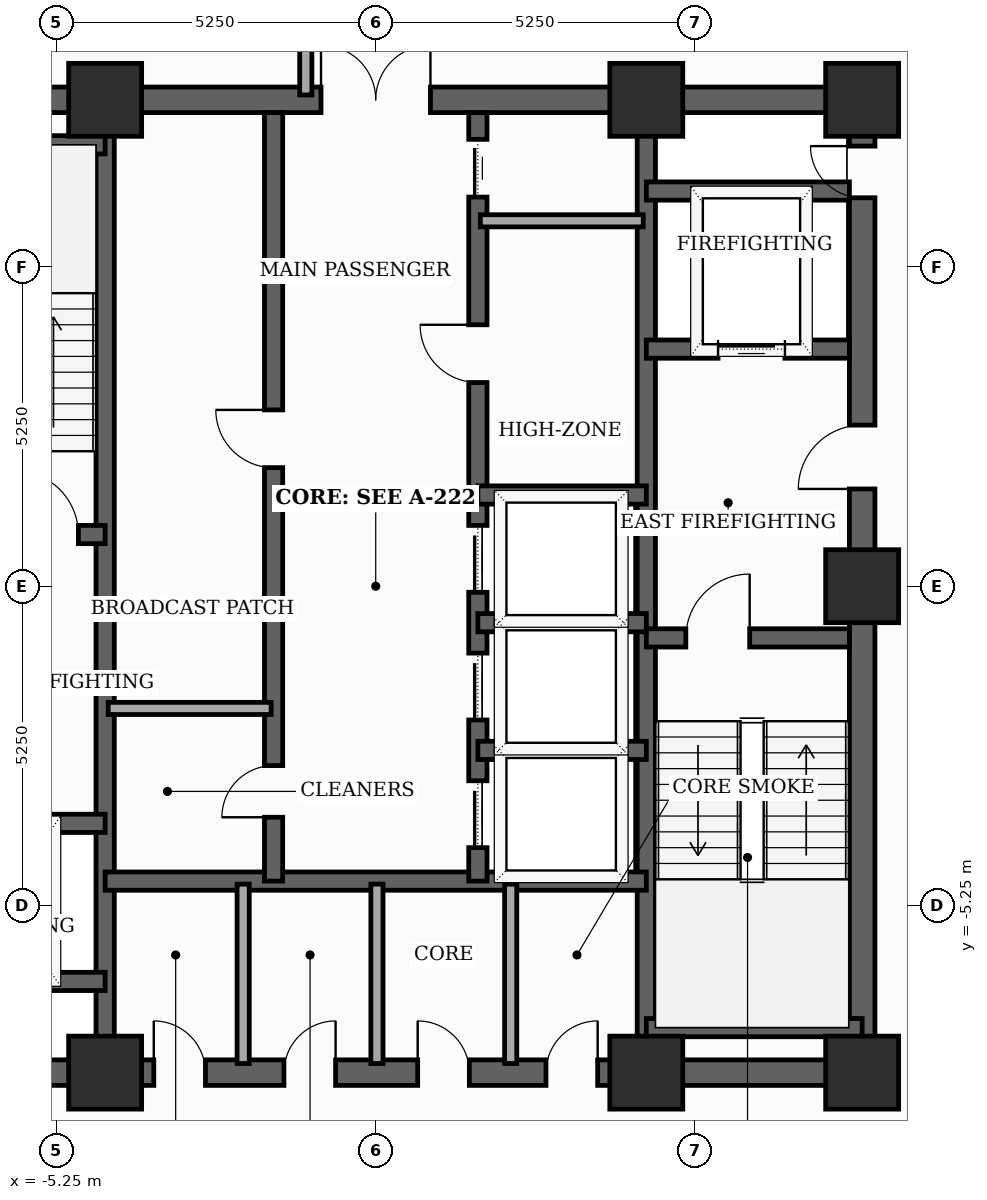
"""IFC4 building model, lengths in metres.
Left out: names, types, materials, properties, quantities, classifications, styles, units other than length and angle.
Written with IfcOpenShell. Run it as: python <this file> out.ifc"""

import sys

from ifc_helpers import new_model, si_unit, direction, frame, frame_2d, origin, origin_2d, place, context, subcontext, project, spatial, rectangle, extrude, element, fill, save


model = new_model("IFC4")
c1 = context("Model", 3, precision=1e-05, world=origin(), true_north=direction((0.0, 1.0)))
c2 = subcontext(c1, "Body", "Model", "MODEL_VIEW")
j1 = project(units=[si_unit("LENGTHUNIT", "METRE"), si_unit("PLANEANGLEUNIT", "RADIAN")], contexts=[c1])
p1 = place(None, origin())
s1 = spatial("IfcSite", under=j1, at=p1, CompositionType="ELEMENT")
p2 = place(p1, origin())
s2 = spatial("IfcBuilding", under=s1, at=p2, CompositionType="ELEMENT")
p3 = place(p2, frame((0.0, 0.0, 241.1)))
s3 = spatial("IfcBuildingStorey", under=s2, at=p3, CompositionType="ELEMENT", Elevation=241.1)
for number, where, z_axis, x_axis in (
    (1, (-4.45, -8.0, 0.0), (0.0, 0.0, 1.0), (1.0, 0.0, 0.0)),
    (2, (4.45, -8.0, 0.0), (0.0, 0.0, 1.0), (1.0, 0.0, 0.0)),
    (3, (8.0, -8.0, 0.0), (0.0, 0.0, 1.0), (1.0, 0.0, 0.0)),
    (4, (8.0, 0.0, 0.0), (0.0, 0.0, 1.0), (1.0, 0.0, 0.0)),
    (5, (8.0, 8.0, 0.0), (0.0, 0.0, 1.0), (1.0, 0.0, 0.0)),
    (6, (4.45, 8.0, 0.0), (0.0, 0.0, 1.0), (1.0, 0.0, 0.0)),
    (7, (-4.45, 8.0, 0.0), (0.0, 0.0, 1.0), (1.0, 0.0, 0.0)),
):
    element("IfcColumn", number, at=place(p3, frame(where, z_axis=z_axis, x_axis=x_axis)), inside=s3, PredefinedType="COLUMN", context=c2, shape_type="SweptSolid", body=[
        extrude(rectangle(XDim=1.2, YDim=1.2, at=origin_2d()), origin(), (0.0, 0.0, 1.0), 3.7),
    ])
p4 = place(p3, frame((8.0, -8.0, 0.0), z_axis=(0.0, 0.0, 1.0), x_axis=(0.0, 1.0, 0.0)))
e8 = element("IfcWall", 8, at=p4, inside=s3, PredefinedType="SHEAR", context=c2, shape_type="SweptSolid", body=[
    extrude(rectangle(XDim=16.0, YDim=0.42, at=frame_2d((8.0, 0.0))), origin(), (0.0, 0.0, 1.0), 3.5),
])
p5 = place(p4, frame((9.6, 0.0, 0.0)))
e9 = element("IfcOpeningElement", 9, at=p5, cuts=e8, PredefinedType="OPENING", context=c2, shape_type="SweptSolid", body=[
    extrude(rectangle(XDim=1.05, YDim=2.15, at=frame_2d((0.525, 1.075))), frame((0.0, 0.22, 0.0), z_axis=(0.0, -1.0, 0.0), x_axis=(1.0, 0.0, 0.0)), (0.0, 0.0, 1.0), 0.44),
])
p6 = place(p4, frame((14.389, 0.0, 0.0)))
e10 = element("IfcOpeningElement", 10, at=p6, cuts=e8, PredefinedType="OPENING", context=c2, shape_type="SweptSolid", body=[
    extrude(rectangle(XDim=0.85, YDim=2.02, at=frame_2d((0.425, 1.01))), frame((0.0, 0.22, 0.0), z_axis=(0.0, -1.0, 0.0), x_axis=(1.0, 0.0, 0.0)), (0.0, 0.0, 1.0), 0.44),
])
p7 = place(p3, frame((-8.0, -8.0, 0.0), z_axis=(0.0, 0.0, 1.0), x_axis=(1.0, 0.0, 0.0)))
e11 = element("IfcWall", 11, at=p7, inside=s3, PredefinedType="SHEAR", context=c2, shape_type="SweptSolid", body=[
    extrude(rectangle(XDim=16.0, YDim=0.42, at=frame_2d((8.0, 0.0))), origin(), (0.0, 0.0, 1.0), 3.5),
])
p8 = place(p7, frame((4.35, 0.0, 0.0)))
e12 = element("IfcOpeningElement", 12, at=p8, cuts=e11, PredefinedType="OPENING", context=c2, shape_type="SweptSolid", body=[
    extrude(rectangle(XDim=0.85, YDim=2.02, at=frame_2d((0.425, 1.01))), frame((0.0, 0.22, 0.0), z_axis=(0.0, -1.0, 0.0), x_axis=(1.0, 0.0, 0.0)), (0.0, 0.0, 1.0), 0.44),
])
p9 = place(p7, frame((6.49, 0.0, 0.0)))
e13 = element("IfcOpeningElement", 13, at=p9, cuts=e11, PredefinedType="OPENING", context=c2, shape_type="SweptSolid", body=[
    extrude(rectangle(XDim=0.85, YDim=2.02, at=frame_2d((0.425, 1.01))), frame((0.0, 0.22, 0.0), z_axis=(0.0, -1.0, 0.0), x_axis=(1.0, 0.0, 0.0)), (0.0, 0.0, 1.0), 0.44),
])
p10 = place(p7, frame((8.69, 0.0, 0.0)))
e14 = element("IfcOpeningElement", 14, at=p10, cuts=e11, PredefinedType="OPENING", context=c2, shape_type="SweptSolid", body=[
    extrude(rectangle(XDim=0.85, YDim=2.02, at=frame_2d((0.425, 1.01))), frame((0.0, 0.22, 0.0), z_axis=(0.0, -1.0, 0.0), x_axis=(1.0, 0.0, 0.0)), (0.0, 0.0, 1.0), 0.44),
])
p11 = place(p7, frame((10.8, 0.0, 0.0)))
e15 = element("IfcOpeningElement", 15, at=p11, cuts=e11, PredefinedType="OPENING", context=c2, shape_type="SweptSolid", body=[
    extrude(rectangle(XDim=0.85, YDim=2.02, at=frame_2d((0.425, 1.01))), frame((0.0, 0.22, 0.0), z_axis=(0.0, -1.0, 0.0), x_axis=(1.0, 0.0, 0.0)), (0.0, 0.0, 1.0), 0.44),
])
p12 = place(p3, frame((-8.0, 8.0, 0.0), z_axis=(0.0, 0.0, 1.0), x_axis=(1.0, 0.0, 0.0)))
e16 = element("IfcWall", 16, at=p12, inside=s3, PredefinedType="SHEAR", context=c2, shape_type="SweptSolid", body=[
    extrude(rectangle(XDim=16.0, YDim=0.42, at=frame_2d((8.0, 0.0))), origin(), (0.0, 0.0, 1.0), 3.5),
])
p13 = place(p12, frame((7.1, 0.0, 0.0)))
e17 = element("IfcOpeningElement", 17, at=p13, cuts=e16, PredefinedType="OPENING", context=c2, shape_type="SweptSolid", body=[
    extrude(rectangle(XDim=1.8, YDim=2.15, at=frame_2d((0.9, 1.075))), frame((0.0, 0.22, 0.0), z_axis=(0.0, -1.0, 0.0), x_axis=(1.0, 0.0, 0.0)), (0.0, 0.0, 1.0), 0.44),
])
for number, where, z_axis, x_axis in (
    (18, (-4.45, -7.79, 0.0), (0.0, 0.0, 1.0), (0.0, 1.0, 0.0)),
    (19, (4.45, -7.79, 0.0), (0.0, 0.0, 1.0), (0.0, 1.0, 0.0)),
):
    element("IfcWall", number, at=place(p3, frame(where, z_axis=z_axis, x_axis=x_axis)), inside=s3, PredefinedType="SHEAR", context=c2, shape_type="SweptSolid", body=[
        extrude(rectangle(XDim=15.58, YDim=0.3, at=frame_2d((7.79, 0.0))), origin(), (0.0, 0.0, 1.0), 3.5),
    ])
p14 = place(p3, frame((-7.79, 0.85, 0.0), z_axis=(0.0, 0.0, 1.0), x_axis=(1.0, 0.0, 0.0)))
e20 = element("IfcWall", 20, at=p14, inside=s3, PredefinedType="SHEAR", context=c2, shape_type="SweptSolid", body=[
    extrude(rectangle(XDim=3.34, YDim=0.3, at=frame_2d((1.67, 0.0))), origin(), (0.0, 0.0, 1.0), 3.5),
])
p15 = place(p14, frame((1.85, 0.0, 0.0)))
e21 = element("IfcOpeningElement", 21, at=p15, cuts=e20, PredefinedType="OPENING", context=c2, shape_type="SweptSolid", body=[
    extrude(rectangle(XDim=1.05, YDim=2.15, at=frame_2d((0.525, 1.075))), frame((0.0, 0.16, 0.0), z_axis=(0.0, -1.0, 0.0), x_axis=(1.0, 0.0, 0.0)), (0.0, 0.0, 1.0), 0.32),
])
p16 = place(p3, frame((-7.79, 7.26, 0.0), z_axis=(0.0, 0.0, 1.0), x_axis=(1.0, 0.0, 0.0)))
e22 = element("IfcWall", 22, at=p16, inside=s3, PredefinedType="SHEAR", context=c2, shape_type="SweptSolid", body=[
    extrude(rectangle(XDim=3.34, YDim=0.3, at=frame_2d((1.67, 0.0))), origin(), (0.0, 0.0, 1.0), 3.5),
])
p17 = place(p3, frame((4.45, -0.85, 0.0), z_axis=(0.0, 0.0, 1.0), x_axis=(1.0, 0.0, 0.0)))
e23 = element("IfcWall", 23, at=p17, inside=s3, PredefinedType="SHEAR", context=c2, shape_type="SweptSolid", body=[
    extrude(rectangle(XDim=3.34, YDim=0.3, at=frame_2d((1.67, 0.0))), origin(), (0.0, 0.0, 1.0), 3.5),
])
p18 = place(p17, frame((0.65, 0.0, 0.0)))
e24 = element("IfcOpeningElement", 24, at=p18, cuts=e23, PredefinedType="OPENING", context=c2, shape_type="SweptSolid", body=[
    extrude(rectangle(XDim=1.05, YDim=2.15, at=frame_2d((0.525, 1.075))), frame((0.0, 0.16, 0.0), z_axis=(0.0, -1.0, 0.0), x_axis=(1.0, 0.0, 0.0)), (0.0, 0.0, 1.0), 0.32),
])
p19 = place(p3, frame((4.45, -7.26, 0.0), z_axis=(0.0, 0.0, 1.0), x_axis=(1.0, 0.0, 0.0)))
e25 = element("IfcWall", 25, at=p19, inside=s3, PredefinedType="SHEAR", context=c2, shape_type="SweptSolid", body=[
    extrude(rectangle(XDim=3.55, YDim=0.3, at=frame_2d((1.775, 0.0))), origin(), (0.0, 0.0, 1.0), 3.5),
])
p20 = place(p3, frame((-7.79, -3.9, 0.0), z_axis=(0.0, 0.0, 1.0), x_axis=(1.0, 0.0, 0.0)))
e26 = element("IfcWall", 26, at=p20, inside=s3, PredefinedType="SHEAR", context=c2, shape_type="SweptSolid", body=[
    extrude(rectangle(XDim=3.34, YDim=0.3, at=frame_2d((1.67, 0.0))), origin(), (0.0, 0.0, 1.0), 3.5),
])
p21 = place(p20, frame((1.27, 0.0, 0.0)))
e27 = element("IfcOpeningElement", 27, at=p21, cuts=e26, PredefinedType="OPENING", context=c2, shape_type="SweptSolid", body=[
    extrude(rectangle(XDim=1.1, YDim=2.1, at=frame_2d((0.55, 1.05))), frame((0.0, 0.16, 0.0), z_axis=(0.0, -1.0, 0.0), x_axis=(1.0, 0.0, 0.0)), (0.0, 0.0, 1.0), 0.32),
])
p22 = place(p3, frame((-7.79, -6.5, 0.0), z_axis=(0.0, 0.0, 1.0), x_axis=(1.0, 0.0, 0.0)))
e28 = element("IfcWall", 28, at=p22, inside=s3, PredefinedType="SHEAR", context=c2, shape_type="SweptSolid", body=[
    extrude(rectangle(XDim=3.34, YDim=0.3, at=frame_2d((1.67, 0.0))), origin(), (0.0, 0.0, 1.0), 3.5),
])
p23 = place(p3, frame((4.45, 3.9, 0.0), z_axis=(0.0, 0.0, 1.0), x_axis=(1.0, 0.0, 0.0)))
e29 = element("IfcWall", 29, at=p23, inside=s3, PredefinedType="SHEAR", context=c2, shape_type="SweptSolid", body=[
    extrude(rectangle(XDim=3.34, YDim=0.3, at=frame_2d((1.67, 0.0))), origin(), (0.0, 0.0, 1.0), 3.5),
])
p24 = place(p23, frame((1.18, 0.0, 0.0)))
e30 = element("IfcOpeningElement", 30, at=p24, cuts=e29, PredefinedType="OPENING", context=c2, shape_type="SweptSolid", body=[
    extrude(rectangle(XDim=1.1, YDim=2.1, at=frame_2d((0.55, 1.05))), frame((0.0, 0.16, 0.0), z_axis=(0.0, -1.0, 0.0), x_axis=(1.0, 0.0, 0.0)), (0.0, 0.0, 1.0), 0.32),
])
p25 = place(p3, frame((4.45, 6.5, 0.0), z_axis=(0.0, 0.0, 1.0), x_axis=(1.0, 0.0, 0.0)))
e31 = element("IfcWall", 31, at=p25, inside=s3, PredefinedType="SHEAR", context=c2, shape_type="SweptSolid", body=[
    extrude(rectangle(XDim=3.34, YDim=0.3, at=frame_2d((1.67, 0.0))), origin(), (0.0, 0.0, 1.0), 3.5),
])
p26 = place(p3, frame((-4.45, -4.85, 0.0), z_axis=(0.0, 0.0, 1.0), x_axis=(1.0, 0.0, 0.0)))
e32 = element("IfcWall", 32, at=p26, inside=s3, PredefinedType="SHEAR", context=c2, shape_type="SweptSolid", body=[
    extrude(rectangle(XDim=8.9, YDim=0.3, at=frame_2d((4.45, 0.0))), origin(), (0.0, 0.0, 1.0), 3.5),
])
p27 = place(p3, frame((-1.68, -4.85, 0.0), z_axis=(0.0, 0.0, 1.0), x_axis=(0.0, 1.0, 0.0)))
e33 = element("IfcWall", 33, at=p27, inside=s3, PredefinedType="SHEAR", context=c2, shape_type="SweptSolid", body=[
    extrude(rectangle(XDim=12.64, YDim=0.3, at=frame_2d((6.32, 0.0))), origin(), (0.0, 0.0, 1.0), 3.5),
])
p28 = place(p27, frame((1.05, 0.0, 0.0)))
e34 = element("IfcOpeningElement", 34, at=p28, cuts=e33, PredefinedType="OPENING", context=c2, shape_type="SweptSolid", body=[
    extrude(rectangle(XDim=0.85, YDim=2.02, at=frame_2d((0.425, 1.01))), frame((0.0, 0.16, 0.0), z_axis=(0.0, -1.0, 0.0), x_axis=(1.0, 0.0, 0.0)), (0.0, 0.0, 1.0), 0.32),
])
p29 = place(p27, frame((6.8, 0.0, 0.0)))
e35 = element("IfcOpeningElement", 35, at=p29, cuts=e33, PredefinedType="OPENING", context=c2, shape_type="SweptSolid", body=[
    extrude(rectangle(XDim=0.95, YDim=2.1, at=frame_2d((0.475, 1.05))), frame((0.0, 0.16, 0.0), z_axis=(0.0, -1.0, 0.0), x_axis=(1.0, 0.0, 0.0)), (0.0, 0.0, 1.0), 0.32),
])
p30 = place(p3, frame((1.68, -4.85, 0.0), z_axis=(0.0, 0.0, 1.0), x_axis=(0.0, 1.0, 0.0)))
e36 = element("IfcWall", 36, at=p30, inside=s3, PredefinedType="SHEAR", context=c2, shape_type="SweptSolid", body=[
    extrude(rectangle(XDim=12.64, YDim=0.3, at=frame_2d((6.32, 0.0))), origin(), (0.0, 0.0, 1.0), 3.5),
])
p31 = place(p30, frame((0.55, 0.0, 0.0)))
e37 = element("IfcOpeningElement", 37, at=p31, cuts=e36, PredefinedType="OPENING", context=c2, shape_type="SweptSolid", body=[
    extrude(rectangle(XDim=1.1, YDim=2.1, at=frame_2d((0.55, 1.05))), frame((0.0, 0.16, 0.0), z_axis=(0.0, -1.0, 0.0), x_axis=(1.0, 0.0, 0.0)), (0.0, 0.0, 1.0), 0.32),
])
p32 = place(p30, frame((2.65, 0.0, 0.0)))
e38 = element("IfcOpeningElement", 38, at=p32, cuts=e36, PredefinedType="OPENING", context=c2, shape_type="SweptSolid", body=[
    extrude(rectangle(XDim=1.1, YDim=2.1, at=frame_2d((0.55, 1.05))), frame((0.0, 0.16, 0.0), z_axis=(0.0, -1.0, 0.0), x_axis=(1.0, 0.0, 0.0)), (0.0, 0.0, 1.0), 0.32),
])
p33 = place(p30, frame((4.75, 0.0, 0.0)))
e39 = element("IfcOpeningElement", 39, at=p33, cuts=e36, PredefinedType="OPENING", context=c2, shape_type="SweptSolid", body=[
    extrude(rectangle(XDim=1.1, YDim=2.1, at=frame_2d((0.55, 1.05))), frame((0.0, 0.16, 0.0), z_axis=(0.0, -1.0, 0.0), x_axis=(1.0, 0.0, 0.0)), (0.0, 0.0, 1.0), 0.32),
])
p34 = place(p30, frame((8.2, 0.0, 0.0)))
e40 = element("IfcOpeningElement", 40, at=p34, cuts=e36, PredefinedType="OPENING", context=c2, shape_type="SweptSolid", body=[
    extrude(rectangle(XDim=0.95, YDim=2.1, at=frame_2d((0.475, 1.05))), frame((0.0, 0.16, 0.0), z_axis=(0.0, -1.0, 0.0), x_axis=(1.0, 0.0, 0.0)), (0.0, 0.0, 1.0), 0.32),
])
p35 = place(p30, frame((11.25, 0.0, 0.0)))
e41 = element("IfcOpeningElement", 41, at=p35, cuts=e36, PredefinedType="OPENING", context=c2, shape_type="SweptSolid", body=[
    extrude(rectangle(XDim=0.95, YDim=2.1, at=frame_2d((0.475, 1.05))), frame((0.0, 0.16, 0.0), z_axis=(0.0, -1.0, 0.0), x_axis=(1.0, 0.0, 0.0)), (0.0, 0.0, 1.0), 0.32),
])
for number, where, z_axis, x_axis in (
    (42, (1.68, 1.5, 0.0), (0.0, 0.0, 1.0), (1.0, 0.0, 0.0)),
    (43, (1.68, -2.7, 0.0), (0.0, 0.0, 1.0), (1.0, 0.0, 0.0)),
    (44, (1.68, -0.6, 0.0), (0.0, 0.0, 1.0), (1.0, 0.0, 0.0)),
):
    element("IfcWall", number, at=place(p3, frame(where, z_axis=z_axis, x_axis=x_axis)), inside=s3, PredefinedType="SHEAR", context=c2, shape_type="SweptSolid", body=[
        extrude(rectangle(XDim=2.77, YDim=0.3, at=frame_2d((1.385, 0.0))), origin(), (0.0, 0.0, 1.0), 3.5),
    ])
for number, where, z_axis, x_axis in (
    (45, (-2.18, -7.85, 0.0), (0.0, 0.0, 1.0), (0.0, 1.0, 0.0)),
    (46, (0.02, -7.85, 0.0), (0.0, 0.0, 1.0), (0.0, 1.0, 0.0)),
    (47, (2.22, -7.85, 0.0), (0.0, 0.0, 1.0), (0.0, 1.0, 0.0)),
):
    element("IfcWall", number, at=place(p3, frame(where, z_axis=z_axis, x_axis=x_axis)), inside=s3, PredefinedType="SOLIDWALL", context=c2, shape_type="SweptSolid", body=[
        extrude(rectangle(XDim=2.95, YDim=0.2, at=frame_2d((1.475, 0.0))), origin(), (0.0, 0.0, 1.0), 2.885),
    ])
for number, where, z_axis, x_axis in (
    (48, (-4.4, -2.01, 0.0), (0.0, 0.0, 1.0), (1.0, 0.0, 0.0)),
    (49, (1.72, 6.01, 0.0), (0.0, 0.0, 1.0), (1.0, 0.0, 0.0)),
):
    element("IfcWall", number, at=place(p3, frame(where, z_axis=z_axis, x_axis=x_axis)), inside=s3, PredefinedType="SOLIDWALL", context=c2, shape_type="SweptSolid", body=[
        extrude(rectangle(XDim=2.68, YDim=0.2, at=frame_2d((1.34, 0.0))), origin(), (0.0, 0.0, 1.0), 3.5),
    ])
p36 = place(p3, frame((-1.15, 10.65, 0.0), z_axis=(0.0, 0.0, 1.0), x_axis=(0.0, -1.0, 0.0)))
e50 = element("IfcWall", 50, at=p36, inside=s3, PredefinedType="SOLIDWALL", context=c2, shape_type="SweptSolid", body=[
    extrude(rectangle(XDim=2.57, YDim=0.2, at=frame_2d((1.285, 0.0))), origin(), (0.0, 0.0, 1.0), 2.885),
])
p37 = place(p5, origin())
e51 = element("IfcDoor", 51, at=p37, inside=s3, OperationType="SINGLE_SWING_LEFT", PredefinedType="DOOR", context=c2, shape_type="SweptSolid", body=[
    extrude(rectangle(XDim=1.05, YDim=2.15, at=frame_2d((0.525, 1.075))), frame((0.0, 0.025, 0.0), z_axis=(0.0, -1.0, 0.0), x_axis=(1.0, 0.0, 0.0)), (0.0, 0.0, 1.0), 0.05),
])
fill(e9, e51)
p38 = place(p6, origin())
e52 = element("IfcDoor", 52, at=p38, inside=s3, OperationType="SINGLE_SWING_RIGHT", PredefinedType="TRAPDOOR", context=c2, shape_type="SweptSolid", body=[
    extrude(rectangle(XDim=0.85, YDim=2.02, at=frame_2d((0.425, 1.01))), frame((0.0, 0.025, 0.0), z_axis=(0.0, -1.0, 0.0), x_axis=(1.0, 0.0, 0.0)), (0.0, 0.0, 1.0), 0.05),
])
fill(e10, e52)
p39 = place(p8, origin())
e53 = element("IfcDoor", 53, at=p39, inside=s3, OperationType="SINGLE_SWING_LEFT", PredefinedType="TRAPDOOR", context=c2, shape_type="SweptSolid", body=[
    extrude(rectangle(XDim=0.85, YDim=2.02, at=frame_2d((0.425, 1.01))), frame((0.0, 0.025, 0.0), z_axis=(0.0, -1.0, 0.0), x_axis=(1.0, 0.0, 0.0)), (0.0, 0.0, 1.0), 0.05),
])
fill(e12, e53)
p40 = place(p9, origin())
e54 = element("IfcDoor", 54, at=p40, inside=s3, OperationType="SINGLE_SWING_RIGHT", PredefinedType="TRAPDOOR", context=c2, shape_type="SweptSolid", body=[
    extrude(rectangle(XDim=0.85, YDim=2.02, at=frame_2d((0.425, 1.01))), frame((0.0, 0.025, 0.0), z_axis=(0.0, -1.0, 0.0), x_axis=(1.0, 0.0, 0.0)), (0.0, 0.0, 1.0), 0.05),
])
fill(e13, e54)
p41 = place(p10, origin())
e55 = element("IfcDoor", 55, at=p41, inside=s3, OperationType="SINGLE_SWING_LEFT", PredefinedType="TRAPDOOR", context=c2, shape_type="SweptSolid", body=[
    extrude(rectangle(XDim=0.85, YDim=2.02, at=frame_2d((0.425, 1.01))), frame((0.0, 0.025, 0.0), z_axis=(0.0, -1.0, 0.0), x_axis=(1.0, 0.0, 0.0)), (0.0, 0.0, 1.0), 0.05),
])
fill(e14, e55)
p42 = place(p11, origin())
e56 = element("IfcDoor", 56, at=p42, inside=s3, OperationType="SINGLE_SWING_RIGHT", PredefinedType="TRAPDOOR", context=c2, shape_type="SweptSolid", body=[
    extrude(rectangle(XDim=0.85, YDim=2.02, at=frame_2d((0.425, 1.01))), frame((0.0, 0.025, 0.0), z_axis=(0.0, -1.0, 0.0), x_axis=(1.0, 0.0, 0.0)), (0.0, 0.0, 1.0), 0.05),
])
fill(e15, e56)
p43 = place(p13, origin())
e57 = element("IfcDoor", 57, at=p43, inside=s3, OperationType="DOUBLE_DOOR_SINGLE_SWING", PredefinedType="DOOR", context=c2, shape_type="SweptSolid", body=[
    extrude(rectangle(XDim=1.8, YDim=2.15, at=frame_2d((0.9, 1.075))), frame((0.0, 0.025, 0.0), z_axis=(0.0, -1.0, 0.0), x_axis=(1.0, 0.0, 0.0)), (0.0, 0.0, 1.0), 0.05),
])
fill(e17, e57)
p44 = place(p15, origin())
e58 = element("IfcDoor", 58, at=p44, inside=s3, OperationType="SINGLE_SWING_LEFT", PredefinedType="DOOR", context=c2, shape_type="SweptSolid", body=[
    extrude(rectangle(XDim=1.05, YDim=2.15, at=frame_2d((0.525, 1.075))), frame((0.0, 0.025, 0.0), z_axis=(0.0, -1.0, 0.0), x_axis=(1.0, 0.0, 0.0)), (0.0, 0.0, 1.0), 0.05),
])
fill(e21, e58)
p45 = place(p18, origin())
e59 = element("IfcDoor", 59, at=p45, inside=s3, OperationType="SINGLE_SWING_RIGHT", PredefinedType="DOOR", context=c2, shape_type="SweptSolid", body=[
    extrude(rectangle(XDim=1.05, YDim=2.15, at=frame_2d((0.525, 1.075))), frame((0.0, 0.025, 0.0), z_axis=(0.0, -1.0, 0.0), x_axis=(1.0, 0.0, 0.0)), (0.0, 0.0, 1.0), 0.05),
])
fill(e24, e59)
p46 = place(p24, origin())
e60 = element("IfcDoor", 60, at=p46, inside=s3, OperationType="SLIDING_TO_LEFT", PredefinedType="DOOR", context=c2, shape_type="SweptSolid", body=[
    extrude(rectangle(XDim=1.1, YDim=2.1, at=frame_2d((0.55, 1.05))), frame((0.0, 0.025, 0.0), z_axis=(0.0, -1.0, 0.0), x_axis=(1.0, 0.0, 0.0)), (0.0, 0.0, 1.0), 0.05),
])
fill(e30, e60)
p47 = place(p28, origin())
e61 = element("IfcDoor", 61, at=p47, inside=s3, OperationType="SINGLE_SWING_LEFT", PredefinedType="TRAPDOOR", context=c2, shape_type="SweptSolid", body=[
    extrude(rectangle(XDim=0.85, YDim=2.02, at=frame_2d((0.425, 1.01))), frame((0.0, 0.025, 0.0), z_axis=(0.0, -1.0, 0.0), x_axis=(1.0, 0.0, 0.0)), (0.0, 0.0, 1.0), 0.05),
])
fill(e34, e61)
p48 = place(p29, origin())
e62 = element("IfcDoor", 62, at=p48, inside=s3, OperationType="SINGLE_SWING_RIGHT", PredefinedType="DOOR", context=c2, shape_type="SweptSolid", body=[
    extrude(rectangle(XDim=0.95, YDim=2.1, at=frame_2d((0.475, 1.05))), frame((0.0, 0.025, 0.0), z_axis=(0.0, -1.0, 0.0), x_axis=(1.0, 0.0, 0.0)), (0.0, 0.0, 1.0), 0.05),
])
fill(e35, e62)
p49 = place(p31, origin())
e63 = element("IfcDoor", 63, at=p49, inside=s3, OperationType="SLIDING_TO_LEFT", PredefinedType="DOOR", context=c2, shape_type="SweptSolid", body=[
    extrude(rectangle(XDim=1.1, YDim=2.1, at=frame_2d((0.55, 1.05))), frame((0.0, 0.025, 0.0), z_axis=(0.0, -1.0, 0.0), x_axis=(1.0, 0.0, 0.0)), (0.0, 0.0, 1.0), 0.05),
])
fill(e37, e63)
p50 = place(p32, origin())
e64 = element("IfcDoor", 64, at=p50, inside=s3, OperationType="SLIDING_TO_LEFT", PredefinedType="DOOR", context=c2, shape_type="SweptSolid", body=[
    extrude(rectangle(XDim=1.1, YDim=2.1, at=frame_2d((0.55, 1.05))), frame((0.0, 0.025, 0.0), z_axis=(0.0, -1.0, 0.0), x_axis=(1.0, 0.0, 0.0)), (0.0, 0.0, 1.0), 0.05),
])
fill(e38, e64)
p51 = place(p33, origin())
e65 = element("IfcDoor", 65, at=p51, inside=s3, OperationType="SLIDING_TO_LEFT", PredefinedType="DOOR", context=c2, shape_type="SweptSolid", body=[
    extrude(rectangle(XDim=1.1, YDim=2.1, at=frame_2d((0.55, 1.05))), frame((0.0, 0.025, 0.0), z_axis=(0.0, -1.0, 0.0), x_axis=(1.0, 0.0, 0.0)), (0.0, 0.0, 1.0), 0.05),
])
fill(e39, e65)
p52 = place(p34, origin())
e66 = element("IfcDoor", 66, at=p52, inside=s3, OperationType="SINGLE_SWING_RIGHT", PredefinedType="DOOR", context=c2, shape_type="SweptSolid", body=[
    extrude(rectangle(XDim=0.95, YDim=2.1, at=frame_2d((0.475, 1.05))), frame((0.0, 0.025, 0.0), z_axis=(0.0, -1.0, 0.0), x_axis=(1.0, 0.0, 0.0)), (0.0, 0.0, 1.0), 0.05),
])
fill(e40, e66)
p53 = place(p35, origin())
e67 = element("IfcDoor", 67, at=p53, inside=s3, OperationType="SLIDING_TO_LEFT", PredefinedType="DOOR", context=c2, shape_type="SweptSolid", body=[
    extrude(rectangle(XDim=0.95, YDim=2.1, at=frame_2d((0.475, 1.05))), frame((0.0, 0.025, 0.0), z_axis=(0.0, -1.0, 0.0), x_axis=(1.0, 0.0, 0.0)), (0.0, 0.0, 1.0), 0.05),
])
fill(e41, e67)
save(model, sys.argv[1])
